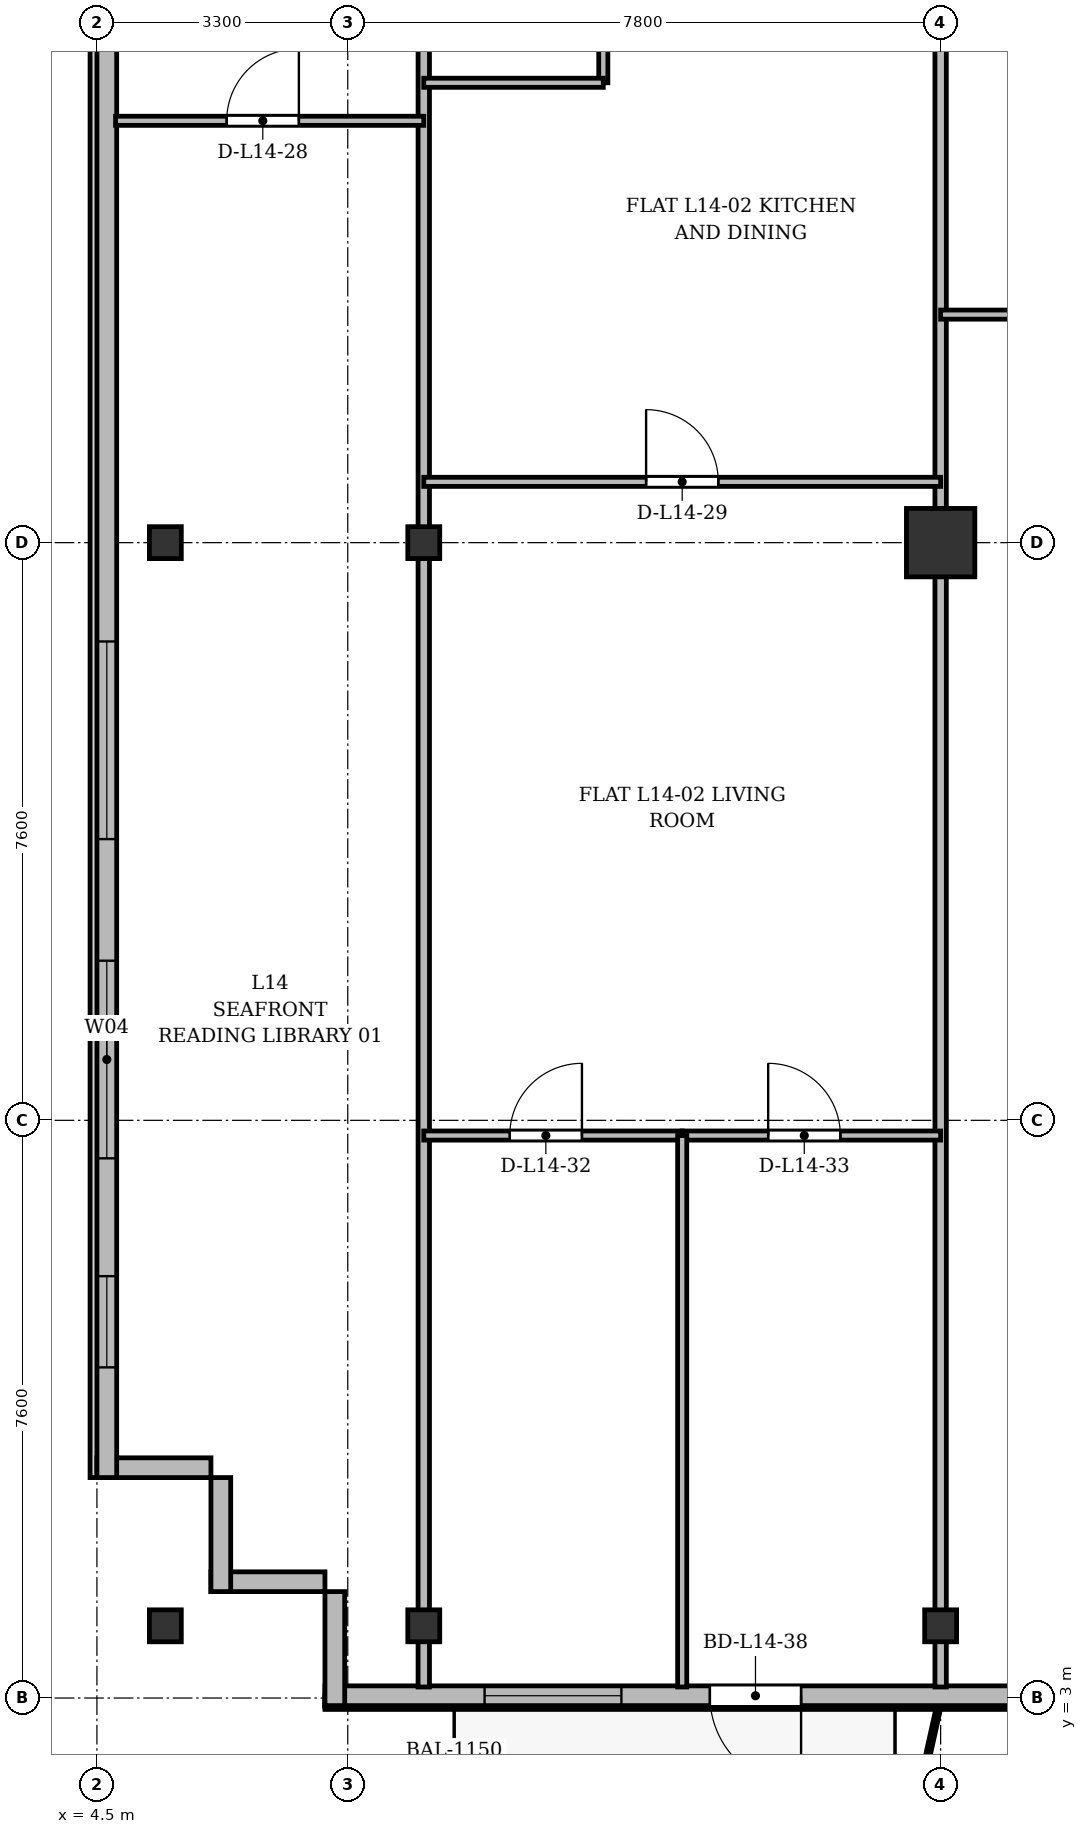
"""IFC4 building model, lengths in metres.
Left out: names, types, materials, properties, quantities, classifications, styles, units other than length and angle.
Written with IfcOpenShell. Run it as: python <this file> out.ifc"""

import sys

from ifc_helpers import new_model, si_unit, direction, frame, frame_2d, origin, origin_2d, place, context, subcontext, project, spatial, rectangle, i_section, extrude, source, transform, mapped, element, fill, save


model = new_model("IFC4")
c1 = context("Model", 3, precision=1e-05, world=origin(), true_north=direction((0.0, 1.0)))
c2 = subcontext(c1, "Body", "Model", "MODEL_VIEW")
j1 = project(units=[si_unit("LENGTHUNIT", "METRE"), si_unit("PLANEANGLEUNIT", "RADIAN")], contexts=[c1])
p1 = place(None, origin())
s1 = spatial("IfcSite", under=j1, at=p1, CompositionType="ELEMENT")
p2 = place(p1, origin())
s2 = spatial("IfcBuilding", under=s1, at=p2, CompositionType="ELEMENT")
p3 = place(p2, frame((0.0, 0.0, 55.9)))
s3 = spatial("IfcBuildingStorey", under=s2, at=p3, CompositionType="ELEMENT", Elevation=55.9)
m1 = source(origin(), c2, "Body", "SweptSolid", [
    extrude(i_section(OverallWidth=0.42, OverallDepth=0.42, WebThickness=0.026, FlangeThickness=0.04, at=origin_2d()), origin(), (0.0, 0.0, 1.0), 3.6),
])
for number, where, z_axis, x_axis in (
    (1, (5.4, 3.95, 0.0), (0.0, 0.0, 1.0), (1.0, 0.0, 0.0)),
    (2, (5.4, 18.2, 0.0), (0.0, 0.0, 1.0), (1.0, 0.0, 0.0)),
    (3, (8.8, 3.95, 0.0), (0.0, 0.0, 1.0), (1.0, 0.0, 0.0)),
    (4, (8.8, 18.2, 0.0), (0.0, 0.0, 1.0), (1.0, 0.0, 0.0)),
    (5, (15.6, 3.95, 0.0), (0.0, 0.0, 1.0), (1.0, 0.0, 0.0)),
):
    element("IfcColumn", number, at=place(p3, frame(where, z_axis=z_axis, x_axis=x_axis)), inside=s3, PredefinedType="COLUMN", context=c2, shape_type="MappedRepresentation", body=[
        mapped(m1, transform((0.0, 0.0, 0.0), x_axis=(1.0, 0.0, 0.0), y_axis=(0.0, 1.0, 0.0), z_axis=(0.0, 0.0, 1.0), scale=1.0)),
    ])
m2 = source(origin(), c2, "Body", "SweptSolid", [
    extrude(rectangle(XDim=0.9, YDim=0.9, at=origin_2d()), origin(), (0.0, 0.0, 1.0), 3.6),
])
p4 = place(p3, frame((15.6, 18.2, 0.0), z_axis=(0.0, 0.0, 1.0), x_axis=(1.0, 0.0, 0.0)))
e6 = element("IfcColumn", 6, at=p4, inside=s3, PredefinedType="COLUMN", context=c2, shape_type="MappedRepresentation", body=[
    mapped(m2, transform((0.0, 0.0, 0.0), x_axis=(1.0, 0.0, 0.0), y_axis=(0.0, 1.0, 0.0), z_axis=(0.0, 0.0, 1.0), scale=1.0)),
])
for number, where, z_axis, x_axis in (
    (7, (7.5, 4.53, 0.0), (0.0, 0.0, 1.0), (-1.0, 0.0, 0.0)),
    (8, (6.13, 4.4, 0.0), (0.0, 0.0, 1.0), (0.0, 1.0, 0.0)),
):
    element("IfcWall", number, at=place(p3, frame(where, z_axis=z_axis, x_axis=x_axis)), inside=s3, PredefinedType="SOLIDWALL", context=c2, shape_type="SweptSolid", body=[
        extrude(rectangle(XDim=1.5, YDim=0.26, at=frame_2d((0.75, 0.0))), origin(), (0.0, 0.0, 1.0), 3.34),
    ])
p5 = place(p3, frame((6.0, 6.03, 0.0), z_axis=(0.0, 0.0, 1.0), x_axis=(-1.0, 0.0, 0.0)))
e9 = element("IfcWall", 9, at=p5, inside=s3, PredefinedType="SOLIDWALL", context=c2, shape_type="SweptSolid", body=[
    extrude(rectangle(XDim=1.5, YDim=0.26, at=frame_2d((0.75, 0.0))), origin(), (0.0, 0.0, 1.0), 2.752),
])
p6 = place(p3, frame((4.63, 5.9, 0.0), z_axis=(0.0, 0.0, 1.0), x_axis=(0.0, 1.0, 0.0)))
e10 = element("IfcWall", 10, at=p6, inside=s3, PredefinedType="SOLIDWALL", context=c2, shape_type="SweptSolid", body=[
    extrude(rectangle(XDim=39.6, YDim=0.26, at=frame_2d((19.8, 0.0))), origin(), (0.0, 0.0, 1.0), 3.34),
])
p7 = place(p6, frame((1.45, 0.0, 0.92)))
e11 = element("IfcOpeningElement", 11, at=p7, cuts=e10, PredefinedType="OPENING", context=c2, shape_type="SweptSolid", body=[
    extrude(rectangle(XDim=1.2, YDim=1.65, at=frame_2d((0.6, 0.825))), frame((0.0, 0.14, 0.0), z_axis=(0.0, -1.0, 0.0), x_axis=(1.0, 0.0, 0.0)), (0.0, 0.0, 1.0), 0.28),
])
p8 = place(p6, frame((4.2, 0.0, 0.92)))
e12 = element("IfcOpeningElement", 12, at=p8, cuts=e10, PredefinedType="OPENING", context=c2, shape_type="SweptSolid", body=[
    extrude(rectangle(XDim=2.6, YDim=1.9, at=frame_2d((1.3, 0.95))), frame((0.0, 0.14, 0.0), z_axis=(0.0, -1.0, 0.0), x_axis=(1.0, 0.0, 0.0)), (0.0, 0.0, 1.0), 0.28),
])
p9 = place(p6, frame((8.4, 0.0, 0.92)))
e13 = element("IfcOpeningElement", 13, at=p9, cuts=e10, PredefinedType="OPENING", context=c2, shape_type="SweptSolid", body=[
    extrude(rectangle(XDim=2.6, YDim=1.9, at=frame_2d((1.3, 0.95))), frame((0.0, 0.14, 0.0), z_axis=(0.0, -1.0, 0.0), x_axis=(1.0, 0.0, 0.0)), (0.0, 0.0, 1.0), 0.28),
])
p10 = place(p6, frame((29.6, 0.0, 0.92)))
e14 = element("IfcOpeningElement", 14, at=p10, cuts=e10, PredefinedType="OPENING", context=c2, shape_type="SweptSolid", body=[
    extrude(rectangle(XDim=2.6, YDim=1.9, at=frame_2d((1.3, 0.95))), frame((0.0, 0.14, 0.0), z_axis=(0.0, -1.0, 0.0), x_axis=(1.0, 0.0, 0.0)), (0.0, 0.0, 1.0), 0.28),
])
p11 = place(p6, frame((33.9, 0.0, 0.92)))
e15 = element("IfcOpeningElement", 15, at=p11, cuts=e10, PredefinedType="OPENING", context=c2, shape_type="SweptSolid", body=[
    extrude(rectangle(XDim=1.2, YDim=1.65, at=frame_2d((0.6, 0.825))), frame((0.0, 0.14, 0.0), z_axis=(0.0, -1.0, 0.0), x_axis=(1.0, 0.0, 0.0)), (0.0, 0.0, 1.0), 0.28),
])
p12 = place(p6, frame((37.25, 0.0, 0.92)))
e16 = element("IfcOpeningElement", 16, at=p12, cuts=e10, PredefinedType="OPENING", context=c2, shape_type="SweptSolid", body=[
    extrude(rectangle(XDim=1.2, YDim=1.65, at=frame_2d((0.6, 0.825))), frame((0.0, 0.14, 0.0), z_axis=(0.0, -1.0, 0.0), x_axis=(1.0, 0.0, 0.0)), (0.0, 0.0, 1.0), 0.28),
])
p13 = place(p3, frame((66.9, 3.03, 0.0), z_axis=(0.0, 0.0, 1.0), x_axis=(-1.0, 0.0, 0.0)))
e17 = element("IfcWall", 17, at=p13, inside=s3, PredefinedType="SOLIDWALL", context=c2, shape_type="SweptSolid", body=[
    extrude(rectangle(XDim=59.4, YDim=0.26, at=frame_2d((29.7, 0.0))), origin(), (0.0, 0.0, 1.0), 3.34),
])
p14 = place(p13, frame((3.8, 0.0, 0.9)))
e18 = element("IfcOpeningElement", 18, at=p14, cuts=e17, PredefinedType="OPENING", context=c2, shape_type="SweptSolid", body=[
    extrude(rectangle(XDim=1.8, YDim=1.8, at=frame_2d((0.9, 0.9))), frame((0.0, 0.14, 0.0), z_axis=(0.0, -1.0, 0.0), x_axis=(1.0, 0.0, 0.0)), (0.0, 0.0, 1.0), 0.28),
])
p15 = place(p13, frame((9.18, 0.0, 0.0)))
e19 = element("IfcOpeningElement", 19, at=p15, cuts=e17, PredefinedType="OPENING", context=c2, shape_type="SweptSolid", body=[
    extrude(rectangle(XDim=1.2, YDim=2.2, at=frame_2d((0.6, 1.1))), frame((0.0, 0.14, 0.0), z_axis=(0.0, -1.0, 0.0), x_axis=(1.0, 0.0, 0.0)), (0.0, 0.0, 1.0), 0.28),
])
p16 = place(p13, frame((13.2, 0.0, 0.9)))
e20 = element("IfcOpeningElement", 20, at=p16, cuts=e17, PredefinedType="OPENING", context=c2, shape_type="SweptSolid", body=[
    extrude(rectangle(XDim=1.5, YDim=1.75, at=frame_2d((0.75, 0.875))), frame((0.0, 0.14, 0.0), z_axis=(0.0, -1.0, 0.0), x_axis=(1.0, 0.0, 0.0)), (0.0, 0.0, 1.0), 0.28),
])
p17 = place(p13, frame((18.5, 0.0, 0.9)))
e21 = element("IfcOpeningElement", 21, at=p17, cuts=e17, PredefinedType="OPENING", context=c2, shape_type="SweptSolid", body=[
    extrude(rectangle(XDim=2.0, YDim=1.95, at=frame_2d((1.0, 0.975))), frame((0.0, 0.14, 0.0), z_axis=(0.0, -1.0, 0.0), x_axis=(1.0, 0.0, 0.0)), (0.0, 0.0, 1.0), 0.28),
])
p18 = place(p13, frame((24.175, 0.0, 0.9)))
e22 = element("IfcOpeningElement", 22, at=p18, cuts=e17, PredefinedType="OPENING", context=c2, shape_type="SweptSolid", body=[
    extrude(rectangle(XDim=1.65, YDim=1.85, at=frame_2d((0.825, 0.925))), frame((0.0, 0.14, 0.0), z_axis=(0.0, -1.0, 0.0), x_axis=(1.0, 0.0, 0.0)), (0.0, 0.0, 1.0), 0.28),
])
p19 = place(p13, frame((28.3, 0.0, 0.9)))
e23 = element("IfcOpeningElement", 23, at=p19, cuts=e17, PredefinedType="OPENING", context=c2, shape_type="SweptSolid", body=[
    extrude(rectangle(XDim=1.8, YDim=1.8, at=frame_2d((0.9, 0.9))), frame((0.0, 0.14, 0.0), z_axis=(0.0, -1.0, 0.0), x_axis=(1.0, 0.0, 0.0)), (0.0, 0.0, 1.0), 0.28),
])
p20 = place(p13, frame((32.8, 0.0, 0.9)))
e24 = element("IfcOpeningElement", 24, at=p20, cuts=e17, PredefinedType="OPENING", context=c2, shape_type="SweptSolid", body=[
    extrude(rectangle(XDim=2.2, YDim=1.8, at=frame_2d((1.1, 0.9))), frame((0.0, 0.14, 0.0), z_axis=(0.0, -1.0, 0.0), x_axis=(1.0, 0.0, 0.0)), (0.0, 0.0, 1.0), 0.28),
])
p21 = place(p13, frame((40.301, 0.0, 0.0)))
e25 = element("IfcOpeningElement", 25, at=p21, cuts=e17, PredefinedType="OPENING", context=c2, shape_type="SweptSolid", body=[
    extrude(rectangle(XDim=1.2, YDim=2.2, at=frame_2d((0.6, 1.1))), frame((0.0, 0.14, 0.0), z_axis=(0.0, -1.0, 0.0), x_axis=(1.0, 0.0, 0.0)), (0.0, 0.0, 1.0), 0.28),
])
p22 = place(p13, frame((46.4, 0.0, 0.9)))
e26 = element("IfcOpeningElement", 26, at=p22, cuts=e17, PredefinedType="OPENING", context=c2, shape_type="SweptSolid", body=[
    extrude(rectangle(XDim=2.0, YDim=1.95, at=frame_2d((1.0, 0.975))), frame((0.0, 0.14, 0.0), z_axis=(0.0, -1.0, 0.0), x_axis=(1.0, 0.0, 0.0)), (0.0, 0.0, 1.0), 0.28),
])
p23 = place(p13, frame((53.136, 0.0, 0.0)))
e27 = element("IfcOpeningElement", 27, at=p23, cuts=e17, PredefinedType="OPENING", context=c2, shape_type="SweptSolid", body=[
    extrude(rectangle(XDim=1.2, YDim=2.2, at=frame_2d((0.6, 1.1))), frame((0.0, 0.14, 0.0), z_axis=(0.0, -1.0, 0.0), x_axis=(1.0, 0.0, 0.0)), (0.0, 0.0, 1.0), 0.28),
])
p24 = place(p13, frame((55.5, 0.0, 0.9)))
e28 = element("IfcOpeningElement", 28, at=p24, cuts=e17, PredefinedType="OPENING", context=c2, shape_type="SweptSolid", body=[
    extrude(rectangle(XDim=1.8, YDim=1.8, at=frame_2d((0.9, 0.9))), frame((0.0, 0.14, 0.0), z_axis=(0.0, -1.0, 0.0), x_axis=(1.0, 0.0, 0.0)), (0.0, 0.0, 1.0), 0.28),
])
p25 = place(p3, frame((7.63, 2.9, 0.0), z_axis=(0.0, 0.0, 1.0), x_axis=(0.0, 1.0, 0.0)))
e29 = element("IfcWall", 29, at=p25, inside=s3, PredefinedType="SOLIDWALL", context=c2, shape_type="SweptSolid", body=[
    extrude(rectangle(XDim=1.5, YDim=0.26, at=frame_2d((0.75, 0.0))), origin(), (0.0, 0.0, 1.0), 2.69),
])
for number, where, z_axis, x_axis in (
    (30, (8.8, 3.145, 0.0), (0.0, 0.0, 1.0), (0.0, 1.0, 0.0)),
    (31, (15.6, 3.145, 0.0), (0.0, 0.0, 1.0), (0.0, 1.0, 0.0)),
):
    element("IfcWall", number, at=place(p3, frame(where, z_axis=z_axis, x_axis=x_axis)), inside=s3, PredefinedType="PARTITIONING", context=c2, shape_type="SweptSolid", body=[
        extrude(rectangle(XDim=24.455, YDim=0.15, at=frame_2d((12.228, 0.0))), origin(), (0.0, 0.0, 1.0), 2.752),
    ])
p26 = place(p3, frame((4.745, 23.75, 0.0), z_axis=(0.0, 0.0, 1.0), x_axis=(1.0, 0.0, 0.0)))
e32 = element("IfcWall", 32, at=p26, inside=s3, PredefinedType="PARTITIONING", context=c2, shape_type="SweptSolid", body=[
    extrude(rectangle(XDim=4.055, YDim=0.12, at=frame_2d((2.027, 0.0))), origin(), (0.0, 0.0, 1.0), 2.752),
])
p27 = place(p26, frame((1.462, 0.0, 0.0)))
e33 = element("IfcOpeningElement", 33, at=p27, cuts=e32, PredefinedType="OPENING", context=c2, shape_type="SweptSolid", body=[
    extrude(rectangle(XDim=0.95, YDim=2.15, at=frame_2d((0.475, 1.075))), frame((0.0, 0.07, 0.0), z_axis=(0.0, -1.0, 0.0), x_axis=(1.0, 0.0, 0.0)), (0.0, 0.0, 1.0), 0.14),
])
p28 = place(p3, frame((8.8, 19.0, 0.0), z_axis=(0.0, 0.0, 1.0), x_axis=(1.0, 0.0, 0.0)))
e34 = element("IfcWall", 34, at=p28, inside=s3, PredefinedType="PARTITIONING", context=c2, shape_type="SweptSolid", body=[
    extrude(rectangle(XDim=6.8, YDim=0.12, at=frame_2d((3.4, 0.0))), origin(), (0.0, 0.0, 1.0), 2.752),
])
p29 = place(p28, frame((2.925, 0.0, 0.0)))
e35 = element("IfcOpeningElement", 35, at=p29, cuts=e34, PredefinedType="OPENING", context=c2, shape_type="SweptSolid", body=[
    extrude(rectangle(XDim=0.95, YDim=2.15, at=frame_2d((0.475, 1.075))), frame((0.0, 0.07, 0.0), z_axis=(0.0, -1.0, 0.0), x_axis=(1.0, 0.0, 0.0)), (0.0, 0.0, 1.0), 0.14),
])
p30 = place(p3, frame((11.162, 24.25, 0.0), z_axis=(0.0, 0.0, 1.0), x_axis=(0.0, 1.0, 0.0)))
e36 = element("IfcWall", 36, at=p30, inside=s3, PredefinedType="PARTITIONING", context=c2, shape_type="SweptSolid", body=[
    extrude(rectangle(XDim=3.35, YDim=0.12, at=frame_2d((1.675, 0.0))), origin(), (0.0, 0.0, 1.0), 2.94),
])
p31 = place(p30, frame((0.8, 0.0, 0.0)))
e37 = element("IfcOpeningElement", 37, at=p31, cuts=e36, PredefinedType="OPENING", context=c2, shape_type="SweptSolid", body=[
    extrude(rectangle(XDim=0.85, YDim=2.1, at=frame_2d((0.425, 1.05))), frame((0.0, 0.07, 0.0), z_axis=(0.0, -1.0, 0.0), x_axis=(1.0, 0.0, 0.0)), (0.0, 0.0, 1.0), 0.14),
])
p32 = place(p3, frame((8.8, 24.25, 0.0), z_axis=(0.0, 0.0, 1.0), x_axis=(1.0, 0.0, 0.0)))
e38 = element("IfcWall", 38, at=p32, inside=s3, PredefinedType="PARTITIONING", context=c2, shape_type="SweptSolid", body=[
    extrude(rectangle(XDim=2.362, YDim=0.12, at=frame_2d((1.181, 0.0))), origin(), (0.0, 0.0, 1.0), 2.752),
])
p33 = place(p3, frame((8.8, 10.4, 0.0), z_axis=(0.0, 0.0, 1.0), x_axis=(1.0, 0.0, 0.0)))
e39 = element("IfcWall", 39, at=p33, inside=s3, PredefinedType="PARTITIONING", context=c2, shape_type="SweptSolid", body=[
    extrude(rectangle(XDim=3.4, YDim=0.12, at=frame_2d((1.7, 0.0))), origin(), (0.0, 0.0, 1.0), 2.752),
])
p34 = place(p33, frame((1.131, 0.0, 0.0)))
e40 = element("IfcOpeningElement", 40, at=p34, cuts=e39, PredefinedType="OPENING", context=c2, shape_type="SweptSolid", body=[
    extrude(rectangle(XDim=0.95, YDim=2.15, at=frame_2d((0.475, 1.075))), frame((0.0, 0.07, 0.0), z_axis=(0.0, -1.0, 0.0), x_axis=(1.0, 0.0, 0.0)), (0.0, 0.0, 1.0), 0.14),
])
p35 = place(p3, frame((12.2, 10.4, 0.0), z_axis=(0.0, 0.0, 1.0), x_axis=(1.0, 0.0, 0.0)))
e41 = element("IfcWall", 41, at=p35, inside=s3, PredefinedType="PARTITIONING", context=c2, shape_type="SweptSolid", body=[
    extrude(rectangle(XDim=3.4, YDim=0.12, at=frame_2d((1.7, 0.0))), origin(), (0.0, 0.0, 1.0), 2.752),
])
p36 = place(p35, frame((1.131, 0.0, 0.0)))
e42 = element("IfcOpeningElement", 42, at=p36, cuts=e41, PredefinedType="OPENING", context=c2, shape_type="SweptSolid", body=[
    extrude(rectangle(XDim=0.95, YDim=2.15, at=frame_2d((0.475, 1.075))), frame((0.0, 0.07, 0.0), z_axis=(0.0, -1.0, 0.0), x_axis=(1.0, 0.0, 0.0)), (0.0, 0.0, 1.0), 0.14),
])
p37 = place(p3, frame((12.2, 3.145, 0.0), z_axis=(0.0, 0.0, 1.0), x_axis=(0.0, 1.0, 0.0)))
e43 = element("IfcWall", 43, at=p37, inside=s3, PredefinedType="PARTITIONING", context=c2, shape_type="SweptSolid", body=[
    extrude(rectangle(XDim=7.255, YDim=0.12, at=frame_2d((3.627, 0.0))), origin(), (0.0, 0.0, 1.0), 2.69),
])
p38 = place(p3, frame((15.6, 21.2, 0.0), z_axis=(0.0, 0.0, 1.0), x_axis=(1.0, 0.0, 0.0)))
e44 = element("IfcWall", 44, at=p38, inside=s3, PredefinedType="PARTITIONING", context=c2, shape_type="SweptSolid", body=[
    extrude(rectangle(XDim=7.8, YDim=0.12, at=frame_2d((3.9, 0.0))), origin(), (0.0, 0.0, 1.0), 2.752),
])
p39 = place(p38, frame((3.333, 0.0, 0.0)))
e45 = element("IfcOpeningElement", 45, at=p39, cuts=e44, PredefinedType="OPENING", context=c2, shape_type="SweptSolid", body=[
    extrude(rectangle(XDim=0.95, YDim=2.15, at=frame_2d((0.475, 1.075))), frame((0.0, 0.07, 0.0), z_axis=(0.0, -1.0, 0.0), x_axis=(1.0, 0.0, 0.0)), (0.0, 0.0, 1.0), 0.14),
])
m3 = source(origin(), c2, "Body", "SweptSolid", [
    extrude(rectangle(XDim=1.2, YDim=1.65, at=frame_2d((0.6, 0.825))), frame((0.0, 0.03, 0.0), z_axis=(0.0, -1.0, 0.0), x_axis=(1.0, 0.0, 0.0)), (0.0, 0.0, 1.0), 0.06),
])
p40 = place(p7, origin())
e46 = element("IfcWindow", 46, at=p40, inside=s3, PartitioningType="SINGLE_PANEL", PredefinedType="WINDOW", context=c2, shape_type="MappedRepresentation", body=[
    mapped(m3, transform((0.0, 0.0, 0.0), x_axis=(1.0, 0.0, 0.0), y_axis=(0.0, 1.0, 0.0), z_axis=(0.0, 0.0, 1.0), scale=1.0)),
])
fill(e11, e46)
m4 = source(origin(), c2, "Body", "SweptSolid", [
    extrude(rectangle(XDim=2.6, YDim=1.9, at=frame_2d((1.3, 0.95))), frame((0.0, 0.03, 0.0), z_axis=(0.0, -1.0, 0.0), x_axis=(1.0, 0.0, 0.0)), (0.0, 0.0, 1.0), 0.06),
])
p41 = place(p8, origin())
e47 = element("IfcWindow", 47, at=p41, inside=s3, PartitioningType="SINGLE_PANEL", PredefinedType="WINDOW", context=c2, shape_type="MappedRepresentation", body=[
    mapped(m4, transform((0.0, 0.0, 0.0), x_axis=(1.0, 0.0, 0.0), y_axis=(0.0, 1.0, 0.0), z_axis=(0.0, 0.0, 1.0), scale=1.0)),
])
fill(e12, e47)
p42 = place(p9, origin())
e48 = element("IfcWindow", 48, at=p42, inside=s3, PartitioningType="SINGLE_PANEL", PredefinedType="WINDOW", context=c2, shape_type="MappedRepresentation", body=[
    mapped(m4, transform((0.0, 0.0, 0.0), x_axis=(1.0, 0.0, 0.0), y_axis=(0.0, 1.0, 0.0), z_axis=(0.0, 0.0, 1.0), scale=1.0)),
])
fill(e13, e48)
m5 = source(origin(), c2, "Body", "SweptSolid", [
    extrude(rectangle(XDim=1.2, YDim=2.2, at=frame_2d((0.6, 1.1))), frame((0.0, 0.025, 0.0), z_axis=(0.0, -1.0, 0.0), x_axis=(1.0, 0.0, 0.0)), (0.0, 0.0, 1.0), 0.05),
])
p43 = place(p23, origin())
e49 = element("IfcDoor", 49, at=p43, inside=s3, OperationType="SINGLE_SWING_LEFT", PredefinedType="DOOR", context=c2, shape_type="MappedRepresentation", body=[
    mapped(m5, transform((0.0, 0.0, 0.0), x_axis=(1.0, 0.0, 0.0), y_axis=(0.0, 1.0, 0.0), z_axis=(0.0, 0.0, 1.0), scale=1.0)),
])
fill(e27, e49)
m6 = source(origin(), c2, "Body", "SweptSolid", [
    extrude(rectangle(XDim=1.8, YDim=1.8, at=frame_2d((0.9, 0.9))), frame((0.0, 0.03, 0.0), z_axis=(0.0, -1.0, 0.0), x_axis=(1.0, 0.0, 0.0)), (0.0, 0.0, 1.0), 0.06),
])
p44 = place(p24, origin())
e50 = element("IfcWindow", 50, at=p44, inside=s3, PartitioningType="SINGLE_PANEL", PredefinedType="WINDOW", context=c2, shape_type="MappedRepresentation", body=[
    mapped(m6, transform((0.0, 0.0, 0.0), x_axis=(1.0, 0.0, 0.0), y_axis=(0.0, 1.0, 0.0), z_axis=(0.0, 0.0, 1.0), scale=1.0)),
])
fill(e28, e50)
m7 = source(origin(), c2, "Body", "SweptSolid", [
    extrude(rectangle(XDim=0.95, YDim=2.15, at=frame_2d((0.475, 1.075))), frame((0.0, 0.025, 0.0), z_axis=(0.0, -1.0, 0.0), x_axis=(1.0, 0.0, 0.0)), (0.0, 0.0, 1.0), 0.05),
])
p45 = place(p27, origin())
e51 = element("IfcDoor", 51, at=p45, inside=s3, OperationType="SINGLE_SWING_RIGHT", PredefinedType="DOOR", context=c2, shape_type="MappedRepresentation", body=[
    mapped(m7, transform((0.0, 0.0, 0.0), x_axis=(1.0, 0.0, 0.0), y_axis=(0.0, 1.0, 0.0), z_axis=(0.0, 0.0, 1.0), scale=1.0)),
])
fill(e33, e51)
p46 = place(p29, origin())
e52 = element("IfcDoor", 52, at=p46, inside=s3, OperationType="SINGLE_SWING_LEFT", PredefinedType="DOOR", context=c2, shape_type="MappedRepresentation", body=[
    mapped(m7, transform((0.0, 0.0, 0.0), x_axis=(1.0, 0.0, 0.0), y_axis=(0.0, 1.0, 0.0), z_axis=(0.0, 0.0, 1.0), scale=1.0)),
])
fill(e35, e52)
p47 = place(p34, origin())
e53 = element("IfcDoor", 53, at=p47, inside=s3, OperationType="SINGLE_SWING_RIGHT", PredefinedType="DOOR", context=c2, shape_type="MappedRepresentation", body=[
    mapped(m7, transform((0.0, 0.0, 0.0), x_axis=(1.0, 0.0, 0.0), y_axis=(0.0, 1.0, 0.0), z_axis=(0.0, 0.0, 1.0), scale=1.0)),
])
fill(e40, e53)
p48 = place(p36, origin())
e54 = element("IfcDoor", 54, at=p48, inside=s3, OperationType="SINGLE_SWING_LEFT", PredefinedType="DOOR", context=c2, shape_type="MappedRepresentation", body=[
    mapped(m7, transform((0.0, 0.0, 0.0), x_axis=(1.0, 0.0, 0.0), y_axis=(0.0, 1.0, 0.0), z_axis=(0.0, 0.0, 1.0), scale=1.0)),
])
fill(e42, e54)
save(model, sys.argv[1])
